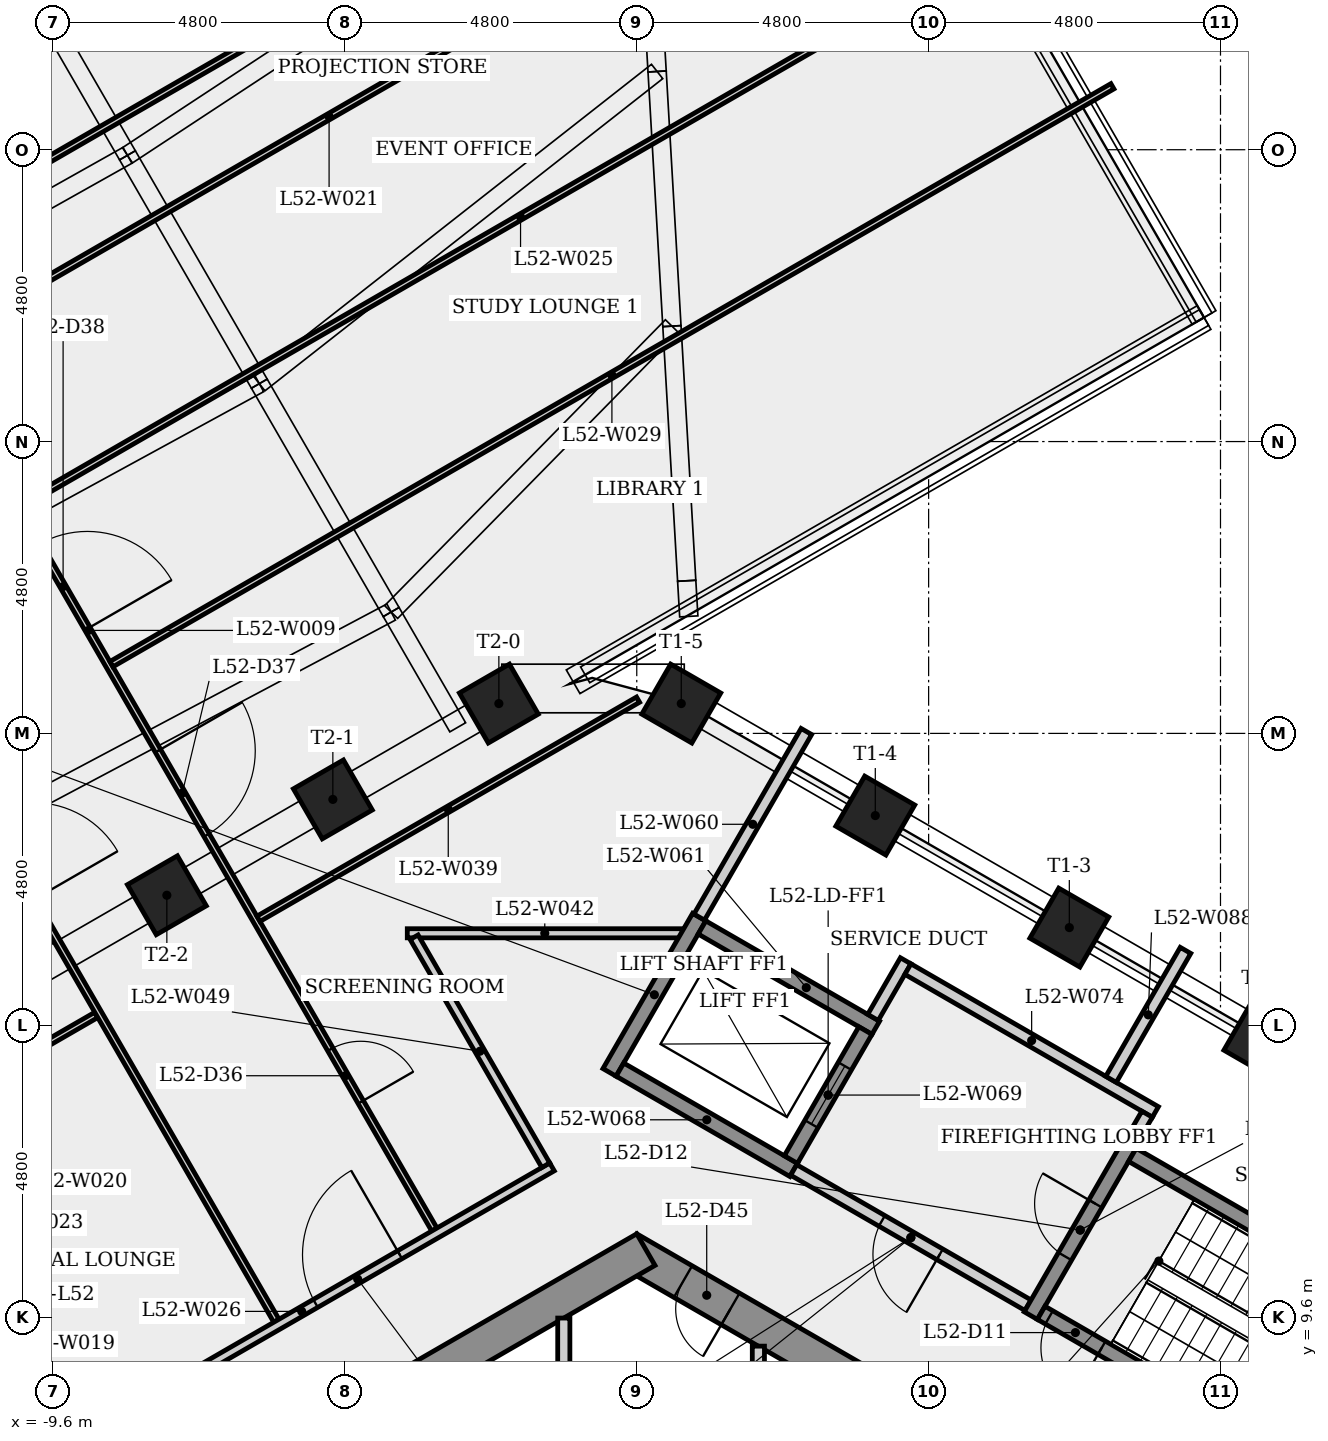
"""IFC4 building model, lengths in metres.
Left out: names, types, materials, properties, quantities, classifications, styles, units other than length and angle.
Written with IfcOpenShell. Run it as: python <this file> out.ifc"""

import sys

from ifc_helpers import new_model, si_unit, direction, frame, frame_2d, origin, origin_2d, place, context, subcontext, project, spatial, rectangle, extrude, element, fill, save


model = new_model("IFC4")
c1 = context("Model", 3, precision=1e-05, world=origin(), true_north=direction((0.0, 1.0)))
c2 = subcontext(c1, "Body", "Model", "MODEL_VIEW")
j1 = project(units=[si_unit("LENGTHUNIT", "METRE"), si_unit("PLANEANGLEUNIT", "RADIAN")], contexts=[c1])
p1 = place(None, origin())
s1 = spatial("IfcSite", under=j1, at=p1, CompositionType="ELEMENT")
p2 = place(p1, origin())
s2 = spatial("IfcBuilding", under=s1, at=p2, CompositionType="ELEMENT")
p3 = place(p2, frame((0.0, 0.0, 194.7)))
s3 = spatial("IfcBuildingStorey", under=s2, at=p3, CompositionType="ELEMENT", Elevation=194.7)
p4 = place(p3, frame((9.35, 5.225, 0.0), z_axis=(0.0, 0.0, 1.0), x_axis=(-0.866023993627, 0.500002442456, 0.0)))
e1 = element("IfcWall", 1, at=p4, inside=s3, PredefinedType="SHEAR", context=c2, shape_type="SweptSolid", body=[
    extrude(rectangle(XDim=10.97, YDim=0.6, at=frame_2d((5.485, 0.0))), origin(), (0.0, 0.0, 1.0), 4.0),
])
p5 = place(p4, frame((9.018, 0.0, 0.0)))
e2 = element("IfcOpeningElement", 2, at=p5, cuts=e1, PredefinedType="OPENING", context=c2, shape_type="SweptSolid", body=[
    extrude(rectangle(XDim=0.9, YDim=2.1, at=frame_2d((0.45, 1.05))), frame((0.0, 0.31, 0.0), z_axis=(0.0, -1.0, 0.0), x_axis=(1.0, 0.0, 0.0)), (0.0, 0.0, 1.0), 0.62),
])
p6 = place(p4, frame((2.211, 0.0, 0.0)))
e3 = element("IfcOpeningElement", 3, at=p6, cuts=e1, PredefinedType="OPENING", context=c2, shape_type="SweptSolid", body=[
    extrude(rectangle(XDim=0.9, YDim=2.1, at=frame_2d((0.45, 1.05))), frame((0.0, 0.31, 0.0), z_axis=(0.0, -1.0, 0.0), x_axis=(1.0, 0.0, 0.0)), (0.0, 0.0, 1.0), 0.62),
])
p7 = place(p3, frame((0.15, 10.71, 0.0), z_axis=(0.0, 0.0, 1.0), x_axis=(-0.866023993627, -0.500002442456, 0.0)))
e4 = element("IfcWall", 4, at=p7, inside=s3, PredefinedType="SHEAR", context=c2, shape_type="SweptSolid", body=[
    extrude(rectangle(XDim=10.97, YDim=0.6, at=frame_2d((5.485, 0.0))), origin(), (0.0, 0.0, 1.0), 4.0),
])
p8 = place(p7, frame((7.397, 0.0, 0.0)))
e5 = element("IfcOpeningElement", 5, at=p8, cuts=e4, PredefinedType="OPENING", context=c2, shape_type="SweptSolid", body=[
    extrude(rectangle(XDim=0.9, YDim=2.1, at=frame_2d((0.45, 1.05))), frame((0.0, 0.31, 0.0), z_axis=(0.0, -1.0, 0.0), x_axis=(1.0, 0.0, 0.0)), (0.0, 0.0, 1.0), 0.62),
])
for number, where, z_axis, x_axis in (
    (6, (10.305, 14.164, 0.0), (0.0, 0.0, 1.0), (0.5, 0.866, 0.0)),
    (7, (7.114, 16.006, 0.0), (0.0, 0.0, 1.0), (0.5, 0.866, 0.0)),
    (8, (3.923, 17.848, 0.0), (0.0, 0.0, 1.0), (0.5, 0.866, 0.0)),
    (9, (0.732, 19.691, 0.0), (0.0, 0.0, 1.0), (0.5, 0.866, 0.0)),
    (10, (-2.268, 19.691, 0.0), (0.0, 0.0, 1.0), (-0.5, 0.866, 0.0)),
    (11, (-4.998, 18.114, 0.0), (0.0, 0.0, 1.0), (-0.5, 0.866, 0.0)),
    (12, (-7.728, 16.538, 0.0), (0.0, 0.0, 1.0), (-0.5, 0.866, 0.0)),
):
    element("IfcColumn", number, at=place(p3, frame(where, z_axis=z_axis, x_axis=x_axis)), inside=s3, PredefinedType="COLUMN", context=c2, shape_type="SweptSolid", body=[
        extrude(rectangle(XDim=0.95, YDim=0.95, at=origin_2d()), origin(), (0.0, 0.0, 1.0), 4.0),
    ])
p9 = place(p3, frame((-17.132, 9.811, 0.0), z_axis=(0.0, 0.0, 1.0), x_axis=(0.866021566356, 0.500006646563, 0.0)))
e13 = element("IfcWall", 13, at=p9, inside=s3, PredefinedType="PARTITIONING", context=c2, shape_type="SweptSolid", body=[
    extrude(rectangle(XDim=9.518, YDim=0.1, at=frame_2d((4.759, 0.0))), origin(), (0.0, 0.0, 1.0), 3.65),
])
p10 = place(p3, frame((-14.708, 30.748, 0.0), z_axis=(0.0, 0.0, 1.0), x_axis=(0.499993923875, -0.866028911808, 0.0)))
e14 = element("IfcWall", 14, at=p10, inside=s3, PredefinedType="PARTITIONING", context=c2, shape_type="SweptSolid", body=[
    extrude(rectangle(XDim=22.758, YDim=0.1, at=frame_2d((11.379, 0.0))), origin(), (0.0, 0.0, 1.0), 3.65),
])
p11 = place(p10, frame((1.731, 0.0, 0.0)))
e15 = element("IfcOpeningElement", 15, at=p11, cuts=e14, PredefinedType="OPENING", context=c2, shape_type="SweptSolid", body=[
    extrude(rectangle(XDim=1.6, YDim=2.1, at=frame_2d((0.8, 1.05))), frame((0.0, 0.06, 0.0), z_axis=(0.0, -1.0, 0.0), x_axis=(1.0, 0.0, 0.0)), (0.0, 0.0, 1.0), 0.12),
])
p12 = place(p10, frame((19.336, 0.0, 0.0)))
e16 = element("IfcOpeningElement", 16, at=p12, cuts=e14, PredefinedType="OPENING", context=c2, shape_type="SweptSolid", body=[
    extrude(rectangle(XDim=1.0, YDim=2.1, at=frame_2d((0.5, 1.05))), frame((0.0, 0.06, 0.0), z_axis=(0.0, -1.0, 0.0), x_axis=(1.0, 0.0, 0.0)), (0.0, 0.0, 1.0), 0.12),
])
p13 = place(p10, frame((13.667, 0.0, 0.0)))
e17 = element("IfcOpeningElement", 17, at=p13, cuts=e14, PredefinedType="OPENING", context=c2, shape_type="SweptSolid", body=[
    extrude(rectangle(XDim=1.6, YDim=2.1, at=frame_2d((0.8, 1.05))), frame((0.0, 0.06, 0.0), z_axis=(0.0, -1.0, 0.0), x_axis=(1.0, 0.0, 0.0)), (0.0, 0.0, 1.0), 0.12),
])
p14 = place(p10, frame((9.746, 0.0, 0.0)))
e18 = element("IfcOpeningElement", 18, at=p14, cuts=e14, PredefinedType="OPENING", context=c2, shape_type="SweptSolid", body=[
    extrude(rectangle(XDim=1.6, YDim=2.1, at=frame_2d((0.8, 1.05))), frame((0.0, 0.06, 0.0), z_axis=(0.0, -1.0, 0.0), x_axis=(1.0, 0.0, 0.0)), (0.0, 0.0, 1.0), 0.12),
])
p15 = place(p10, frame((7.041, 0.0, 0.0)))
e19 = element("IfcOpeningElement", 19, at=p15, cuts=e14, PredefinedType="OPENING", context=c2, shape_type="SweptSolid", body=[
    extrude(rectangle(XDim=1.0, YDim=2.1, at=frame_2d((0.5, 1.05))), frame((0.0, 0.06, 0.0), z_axis=(0.0, -1.0, 0.0), x_axis=(1.0, 0.0, 0.0)), (0.0, 0.0, 1.0), 0.12),
])
p16 = place(p3, frame((-11.894, 11.095, 0.0), z_axis=(0.0, 0.0, 1.0), x_axis=(0.500030632641, -0.866007717299, 0.0)))
e20 = element("IfcWall", 20, at=p16, inside=s3, PredefinedType="PARTITIONING", context=c2, shape_type="SweptSolid", body=[
    extrude(rectangle(XDim=4.48, YDim=0.15, at=frame_2d((2.24, 0.0))), origin(), (0.0, 0.0, 1.0), 3.65),
])
p17 = place(p3, frame((-14.342, 24.115, 0.0), z_axis=(0.0, 0.0, 1.0), x_axis=(0.500000372387, -0.866025188786, 0.0)))
e21 = element("IfcWall", 21, at=p17, inside=s3, PredefinedType="PARTITIONING", context=c2, shape_type="SweptSolid", body=[
    extrude(rectangle(XDim=16.831, YDim=0.1, at=frame_2d((8.415, 0.0))), origin(), (0.0, 0.0, 1.0), 3.65),
])
p18 = place(p17, frame((7.237, 0.0, 0.0)))
e22 = element("IfcOpeningElement", 22, at=p18, cuts=e21, PredefinedType="OPENING", context=c2, shape_type="SweptSolid", body=[
    extrude(rectangle(XDim=1.6, YDim=2.1, at=frame_2d((0.8, 1.05))), frame((0.0, 0.06, 0.0), z_axis=(0.0, -1.0, 0.0), x_axis=(1.0, 0.0, 0.0)), (0.0, 0.0, 1.0), 0.12),
])
p19 = place(p3, frame((-11.645, 25.544, 0.0), z_axis=(0.0, 0.0, 1.0), x_axis=(0.866029456041, 0.49999298122, 0.0)))
e23 = element("IfcWall", 23, at=p19, inside=s3, PredefinedType="PARTITIONING", context=c2, shape_type="SweptSolid", body=[
    extrude(rectangle(XDim=19.009, YDim=0.1, at=frame_2d((9.504, 0.0))), origin(), (0.0, 0.0, 1.0), 3.65),
])
p20 = place(p3, frame((-10.142, 22.941, 0.0), z_axis=(0.0, 0.0, 1.0), x_axis=(0.866020683813, 0.50000817514, 0.0)))
e24 = element("IfcWall", 24, at=p20, inside=s3, PredefinedType="PARTITIONING", context=c2, shape_type="SweptSolid", body=[
    extrude(rectangle(XDim=19.009, YDim=0.1, at=frame_2d((9.504, 0.0))), origin(), (0.0, 0.0, 1.0), 3.275),
])
p21 = place(p3, frame((-9.626, 7.317, 0.0), z_axis=(0.0, 0.0, 1.0), x_axis=(0.866032896488, 0.499987022033, 0.0)))
e25 = element("IfcWall", 25, at=p21, inside=s3, PredefinedType="PARTITIONING", context=c2, shape_type="SweptSolid", body=[
    extrude(rectangle(XDim=9.506, YDim=0.15, at=frame_2d((4.753, 0.0))), origin(), (0.0, 0.0, 1.0), 3.65),
])
p22 = place(p21, frame((5.015, 0.0, 0.0)))
e26 = element("IfcOpeningElement", 26, at=p22, cuts=e25, PredefinedType="OPENING", context=c2, shape_type="SweptSolid", body=[
    extrude(rectangle(XDim=1.6, YDim=2.1, at=frame_2d((0.8, 1.05))), frame((0.0, 0.085, 0.0), z_axis=(0.0, -1.0, 0.0), x_axis=(1.0, 0.0, 0.0)), (0.0, 0.0, 1.0), 0.17),
])
p23 = place(p3, frame((-8.64, 20.339, 0.0), z_axis=(0.0, 0.0, 1.0), x_axis=(0.866023894726, 0.500002613756, 0.0)))
e27 = element("IfcWall", 27, at=p23, inside=s3, PredefinedType="PARTITIONING", context=c2, shape_type="SweptSolid", body=[
    extrude(rectangle(XDim=19.009, YDim=0.1, at=frame_2d((9.505, 0.0))), origin(), (0.0, 0.0, 1.0), 3.275),
])
p24 = place(p3, frame((-6.222, 16.151, 0.0), z_axis=(0.0, 0.0, 1.0), x_axis=(0.866025419677, 0.499999972474, 0.0)))
e28 = element("IfcWall", 28, at=p24, inside=s3, PredefinedType="PARTITIONING", context=c2, shape_type="SweptSolid", body=[
    extrude(rectangle(XDim=7.209, YDim=0.1, at=frame_2d((3.604, 0.0))), origin(), (0.0, 0.0, 1.0), 3.65),
])
p25 = place(p3, frame((-3.774, 15.913, 0.0), z_axis=(0.0, 0.0, 1.0), x_axis=(1.0, 0.0, 0.0)))
e29 = element("IfcWall", 29, at=p25, inside=s3, PredefinedType="PARTITIONING", context=c2, shape_type="SweptSolid", body=[
    extrude(rectangle(XDim=4.522, YDim=0.15, at=frame_2d((2.261, 0.0))), origin(), (0.0, 0.0, 1.0), 3.65),
])
p26 = place(p3, frame((-1.496, 12.098, 0.0), z_axis=(0.0, 0.0, 1.0), x_axis=(-0.500038050611, 0.866003434139, 0.0)))
e30 = element("IfcWall", 30, at=p26, inside=s3, PredefinedType="PARTITIONING", context=c2, shape_type="SweptSolid", body=[
    extrude(rectangle(XDim=4.33, YDim=0.15, at=frame_2d((2.165, 0.0))), origin(), (0.0, 0.0, 1.0), 3.65),
])
p27 = place(p3, frame((-1.2, 9.584, 0.0), z_axis=(0.0, 0.0, 1.0), x_axis=(0.0, -1.0, 0.0)))
e31 = element("IfcWall", 31, at=p27, inside=s3, PredefinedType="PARTITIONING", context=c2, shape_type="SweptSolid", body=[
    extrude(rectangle(XDim=4.309, YDim=0.2, at=frame_2d((2.155, 0.0))), origin(), (0.0, 0.0, 1.0), 3.65),
])
p28 = place(p3, frame((-0.448, 13.624, 0.0), z_axis=(0.0, 0.0, 1.0), x_axis=(0.500037662692, 0.866003658127, 0.0)))
e32 = element("IfcWall", 32, at=p28, inside=s3, PredefinedType="SHEAR", context=c2, shape_type="SweptSolid", body=[
    extrude(rectangle(XDim=2.95, YDim=0.25, at=frame_2d((1.475, 0.0))), origin(), (0.0, 0.0, 1.0), 3.65),
])
p29 = place(p3, frame((1.027, 16.179, 0.0), z_axis=(0.0, 0.0, 1.0), x_axis=(0.499998282143, 0.866026395587, 0.0)))
e33 = element("IfcWall", 33, at=p29, inside=s3, PredefinedType="PLUMBINGWALL", context=c2, shape_type="SweptSolid", body=[
    extrude(rectangle(XDim=3.524, YDim=0.2, at=frame_2d((1.762, 0.0))), origin(), (0.0, 0.0, 1.0), 3.65),
])
p30 = place(p3, frame((1.073, 16.008, 0.0), z_axis=(0.0, 0.0, 1.0), x_axis=(0.866040211805, -0.499974350878, 0.0)))
e34 = element("IfcWall", 34, at=p30, inside=s3, PredefinedType="SHEAR", context=c2, shape_type="SweptSolid", body=[
    extrude(rectangle(XDim=3.3, YDim=0.25, at=frame_2d((1.65, 0.0))), origin(), (0.0, 0.0, 1.0), 3.65),
])
p31 = place(p3, frame((2.0, 9.122, 0.0), z_axis=(0.0, 0.0, 1.0), x_axis=(0.0, -1.0, 0.0)))
e35 = element("IfcWall", 35, at=p31, inside=s3, PredefinedType="PARTITIONING", context=c2, shape_type="SweptSolid", body=[
    extrude(rectangle(XDim=3.847, YDim=0.2, at=frame_2d((1.924, 0.0))), origin(), (0.0, 0.0, 1.0), 3.65),
])
p32 = place(p3, frame((2.581, 12.02, 0.0), z_axis=(0.0, 0.0, 1.0), x_axis=(-0.866040211805, 0.499974350878, 0.0)))
e36 = element("IfcWall", 36, at=p32, inside=s3, PredefinedType="SHEAR", context=c2, shape_type="SweptSolid", body=[
    extrude(rectangle(XDim=3.3, YDim=0.25, at=frame_2d((1.65, 0.0))), origin(), (0.0, 0.0, 1.0), 3.65),
])
p33 = place(p3, frame((2.535, 12.191, 0.0), z_axis=(0.0, 0.0, 1.0), x_axis=(0.500061746146, 0.865989751695, 0.0)))
e37 = element("IfcWall", 37, at=p33, inside=s3, PredefinedType="SHEAR", context=c2, shape_type="SweptSolid", body=[
    extrude(rectangle(XDim=2.45, YDim=0.25, at=frame_2d((1.225, 0.0))), origin(), (0.0, 0.0, 1.0), 4.0),
])
p34 = place(p33, frame((0.675, 0.0, 0.0)))
e38 = element("IfcOpeningElement", 38, at=p34, cuts=e37, PredefinedType="OPENING", context=c2, shape_type="SweptSolid", body=[
    extrude(rectangle(XDim=1.1, YDim=2.1, at=frame_2d((0.55, 1.05))), frame((0.0, 0.135, 0.0), z_axis=(0.0, -1.0, 0.0), x_axis=(1.0, 0.0, 0.0)), (0.0, 0.0, 1.0), 0.27),
])
p35 = place(p3, frame((3.971, 36.514, 0.0), z_axis=(0.0, 0.0, 1.0), x_axis=(-0.866026245231, -0.499998542569, 0.0)))
e39 = element("IfcWall", 39, at=p35, inside=s3, PredefinedType="PARTITIONING", context=c2, shape_type="SweptSolid", body=[
    extrude(rectangle(XDim=19.009, YDim=0.1, at=frame_2d((9.504, 0.0))), origin(), (0.0, 0.0, 1.0), 3.275),
])
p36 = place(p35, frame((9.427, 0.0, 0.0)))
e40 = element("IfcOpeningElement", 40, at=p36, cuts=e39, PredefinedType="OPENING", context=c2, shape_type="SweptSolid", body=[
    extrude(rectangle(XDim=0.9, YDim=2.1, at=frame_2d((0.45, 1.05))), frame((0.0, 0.06, 0.0), z_axis=(0.0, -1.0, 0.0), x_axis=(1.0, 0.0, 0.0)), (0.0, 0.0, 1.0), 0.12),
])
p37 = place(p3, frame((3.885, 14.529, 0.0), z_axis=(0.0, 0.0, 1.0), x_axis=(0.499997628298, 0.866026773083, 0.0)))
e41 = element("IfcWall", 41, at=p37, inside=s3, PredefinedType="PLUMBINGWALL", context=c2, shape_type="SweptSolid", body=[
    extrude(rectangle(XDim=1.075, YDim=0.2, at=frame_2d((0.538, 0.0))), origin(), (0.0, 0.0, 1.0), 3.65),
])
p38 = place(p3, frame((4.459, 15.323, 0.0), z_axis=(0.0, 0.0, 1.0), x_axis=(0.866016039709, -0.500016218704, 0.0)))
e42 = element("IfcWall", 42, at=p38, inside=s3, PredefinedType="PLUMBINGWALL", context=c2, shape_type="SweptSolid", body=[
    extrude(rectangle(XDim=4.7, YDim=0.2, at=frame_2d((2.35, 0.0))), origin(), (0.0, 0.0, 1.0), 3.65),
])
p39 = place(p3, frame((6.435, 9.795, 0.0), z_axis=(0.0, 0.0, 1.0), x_axis=(-0.866012907634, 0.500021643343, 0.0)))
e43 = element("IfcWall", 43, at=p39, inside=s3, PredefinedType="PARTITIONING", context=c2, shape_type="SweptSolid", body=[
    extrude(rectangle(XDim=4.45, YDim=0.2, at=frame_2d((2.225, 0.0))), origin(), (0.0, 0.0, 1.0), 3.65),
])
p40 = place(p39, frame((1.675, 0.0, 0.0)))
e44 = element("IfcOpeningElement", 44, at=p40, cuts=e43, PredefinedType="OPENING", context=c2, shape_type="SweptSolid", body=[
    extrude(rectangle(XDim=1.1, YDim=2.1, at=frame_2d((0.55, 1.05))), frame((0.0, 0.11, 0.0), z_axis=(0.0, -1.0, 0.0), x_axis=(1.0, 0.0, 0.0)), (0.0, 0.0, 1.0), 0.22),
])
p41 = place(p3, frame((6.48, 9.624, 0.0), z_axis=(0.0, 0.0, 1.0), x_axis=(0.500017246033, 0.866015446554, 0.0)))
e45 = element("IfcWall", 45, at=p41, inside=s3, PredefinedType="SHEAR", context=c2, shape_type="SweptSolid", body=[
    extrude(rectangle(XDim=3.25, YDim=0.25, at=frame_2d((1.625, 0.0))), origin(), (0.0, 0.0, 1.0), 3.65),
])
p42 = place(p41, frame((1.125, 0.0, 0.0)))
e46 = element("IfcOpeningElement", 46, at=p42, cuts=e45, PredefinedType="OPENING", context=c2, shape_type="SweptSolid", body=[
    extrude(rectangle(XDim=1.0, YDim=2.1, at=frame_2d((0.5, 1.05))), frame((0.0, 0.135, 0.0), z_axis=(0.0, -1.0, 0.0), x_axis=(1.0, 0.0, 0.0)), (0.0, 0.0, 1.0), 0.27),
])
p43 = place(p3, frame((7.8, 13.51, 0.0), z_axis=(0.0, 0.0, 1.0), x_axis=(0.499955409341, 0.866051146683, 0.0)))
e47 = element("IfcWall", 47, at=p43, inside=s3, PredefinedType="PLUMBINGWALL", context=c2, shape_type="SweptSolid", body=[
    extrude(rectangle(XDim=2.449, YDim=0.2, at=frame_2d((1.225, 0.0))), origin(), (0.0, 0.0, 1.0), 3.65),
])
p44 = place(p3, frame((8.151, 12.268, 0.0), z_axis=(0.0, 0.0, 1.0), x_axis=(0.866025499775, -0.499999833739, 0.0)))
e48 = element("IfcWall", 48, at=p44, inside=s3, PredefinedType="SHEAR", context=c2, shape_type="SweptSolid", body=[
    extrude(rectangle(XDim=6.4, YDim=0.25, at=frame_2d((3.2, 0.0))), origin(), (0.0, 0.0, 1.0), 3.65),
])
p45 = place(p3, frame((8.393, 12.937, 0.0), z_axis=(0.0, 0.0, 1.0), x_axis=(-0.500065409566, -0.86598763626, 0.0)))
e49 = element("IfcWall", 49, at=p45, inside=s3, PredefinedType="PLUMBINGWALL", context=c2, shape_type="SweptSolid", body=[
    extrude(rectangle(XDim=0.575, YDim=0.2, at=frame_2d((0.288, 0.0))), origin(), (0.0, 0.0, 1.0), 3.65),
])
p46 = place(p3, frame((12.194, 6.47, 0.0), z_axis=(0.0, 0.0, 1.0), x_axis=(-0.866025499775, 0.499999833739, 0.0)))
e50 = element("IfcWall", 50, at=p46, inside=s3, PredefinedType="SHEAR", context=c2, shape_type="SweptSolid", body=[
    extrude(rectangle(XDim=6.4, YDim=0.25, at=frame_2d((3.2, 0.0))), origin(), (0.0, 0.0, 1.0), 3.65),
])
p47 = place(p46, frame((5.25, 0.0, 0.0)))
e51 = element("IfcOpeningElement", 51, at=p47, cuts=e50, PredefinedType="OPENING", context=c2, shape_type="SweptSolid", body=[
    extrude(rectangle(XDim=1.0, YDim=2.1, at=frame_2d((0.5, 1.05))), frame((0.0, 0.135, 0.0), z_axis=(0.0, -1.0, 0.0), x_axis=(1.0, 0.0, 0.0)), (0.0, 0.0, 1.0), 0.27),
])
p48 = place(p47, origin())
e52 = element("IfcDoor", 52, at=p48, inside=s3, OperationType="SINGLE_SWING_LEFT", PredefinedType="DOOR", context=c2, shape_type="SweptSolid", body=[
    extrude(rectangle(XDim=1.0, YDim=2.1, at=frame_2d((0.5, 1.05))), frame((0.0, 0.025, 0.0), z_axis=(0.0, -1.0, 0.0), x_axis=(1.0, 0.0, 0.0)), (0.0, 0.0, 1.0), 0.05),
])
fill(e51, e52)
p49 = place(p42, origin())
e53 = element("IfcDoor", 53, at=p49, inside=s3, OperationType="SINGLE_SWING_RIGHT", PredefinedType="DOOR", context=c2, shape_type="SweptSolid", body=[
    extrude(rectangle(XDim=1.0, YDim=2.1, at=frame_2d((0.5, 1.05))), frame((0.0, 0.025, 0.0), z_axis=(0.0, -1.0, 0.0), x_axis=(1.0, 0.0, 0.0)), (0.0, 0.0, 1.0), 0.05),
])
fill(e46, e53)
p50 = place(p40, origin())
e54 = element("IfcDoor", 54, at=p50, inside=s3, OperationType="SINGLE_SWING_LEFT", PredefinedType="DOOR", context=c2, shape_type="SweptSolid", body=[
    extrude(rectangle(XDim=1.1, YDim=2.1, at=frame_2d((0.55, 1.05))), frame((0.0, 0.025, 0.0), z_axis=(0.0, -1.0, 0.0), x_axis=(1.0, 0.0, 0.0)), (0.0, 0.0, 1.0), 0.05),
])
fill(e44, e54)
p51 = place(p34, origin())
e55 = element("IfcDoor", 55, at=p51, inside=s3, OperationType="SLIDING_TO_LEFT", PredefinedType="DOOR", context=c2, shape_type="SweptSolid", body=[
    extrude(rectangle(XDim=1.1, YDim=2.1, at=frame_2d((0.55, 1.05))), frame((0.0, 0.025, 0.0), z_axis=(0.0, -1.0, 0.0), x_axis=(1.0, 0.0, 0.0)), (0.0, 0.0, 1.0), 0.05),
])
fill(e38, e55)
p52 = place(p22, origin())
e56 = element("IfcDoor", 56, at=p52, inside=s3, OperationType="SINGLE_SWING_RIGHT", PredefinedType="DOOR", context=c2, shape_type="SweptSolid", body=[
    extrude(rectangle(XDim=1.6, YDim=2.1, at=frame_2d((0.8, 1.05))), frame((0.0, 0.025, 0.0), z_axis=(0.0, -1.0, 0.0), x_axis=(1.0, 0.0, 0.0)), (0.0, 0.0, 1.0), 0.05),
])
fill(e26, e56)
p53 = place(p12, origin())
e57 = element("IfcDoor", 57, at=p53, inside=s3, OperationType="SINGLE_SWING_RIGHT", PredefinedType="DOOR", context=c2, shape_type="SweptSolid", body=[
    extrude(rectangle(XDim=1.0, YDim=2.1, at=frame_2d((0.5, 1.05))), frame((0.0, 0.025, 0.0), z_axis=(0.0, -1.0, 0.0), x_axis=(1.0, 0.0, 0.0)), (0.0, 0.0, 1.0), 0.05),
])
fill(e16, e57)
p54 = place(p13, origin())
e58 = element("IfcDoor", 58, at=p54, inside=s3, OperationType="SINGLE_SWING_LEFT", PredefinedType="DOOR", context=c2, shape_type="SweptSolid", body=[
    extrude(rectangle(XDim=1.6, YDim=2.1, at=frame_2d((0.8, 1.05))), frame((0.0, 0.025, 0.0), z_axis=(0.0, -1.0, 0.0), x_axis=(1.0, 0.0, 0.0)), (0.0, 0.0, 1.0), 0.05),
])
fill(e17, e58)
p55 = place(p14, origin())
e59 = element("IfcDoor", 59, at=p55, inside=s3, OperationType="SINGLE_SWING_RIGHT", PredefinedType="DOOR", context=c2, shape_type="SweptSolid", body=[
    extrude(rectangle(XDim=1.6, YDim=2.1, at=frame_2d((0.8, 1.05))), frame((0.0, 0.025, 0.0), z_axis=(0.0, -1.0, 0.0), x_axis=(1.0, 0.0, 0.0)), (0.0, 0.0, 1.0), 0.05),
])
fill(e18, e59)
p56 = place(p5, origin())
e60 = element("IfcDoor", 60, at=p56, inside=s3, OperationType="SINGLE_SWING_LEFT", PredefinedType="DOOR", context=c2, shape_type="SweptSolid", body=[
    extrude(rectangle(XDim=0.9, YDim=2.1, at=frame_2d((0.45, 1.05))), frame((0.0, 0.025, 0.0), z_axis=(0.0, -1.0, 0.0), x_axis=(1.0, 0.0, 0.0)), (0.0, 0.0, 1.0), 0.05),
])
fill(e2, e60)
save(model, sys.argv[1])
